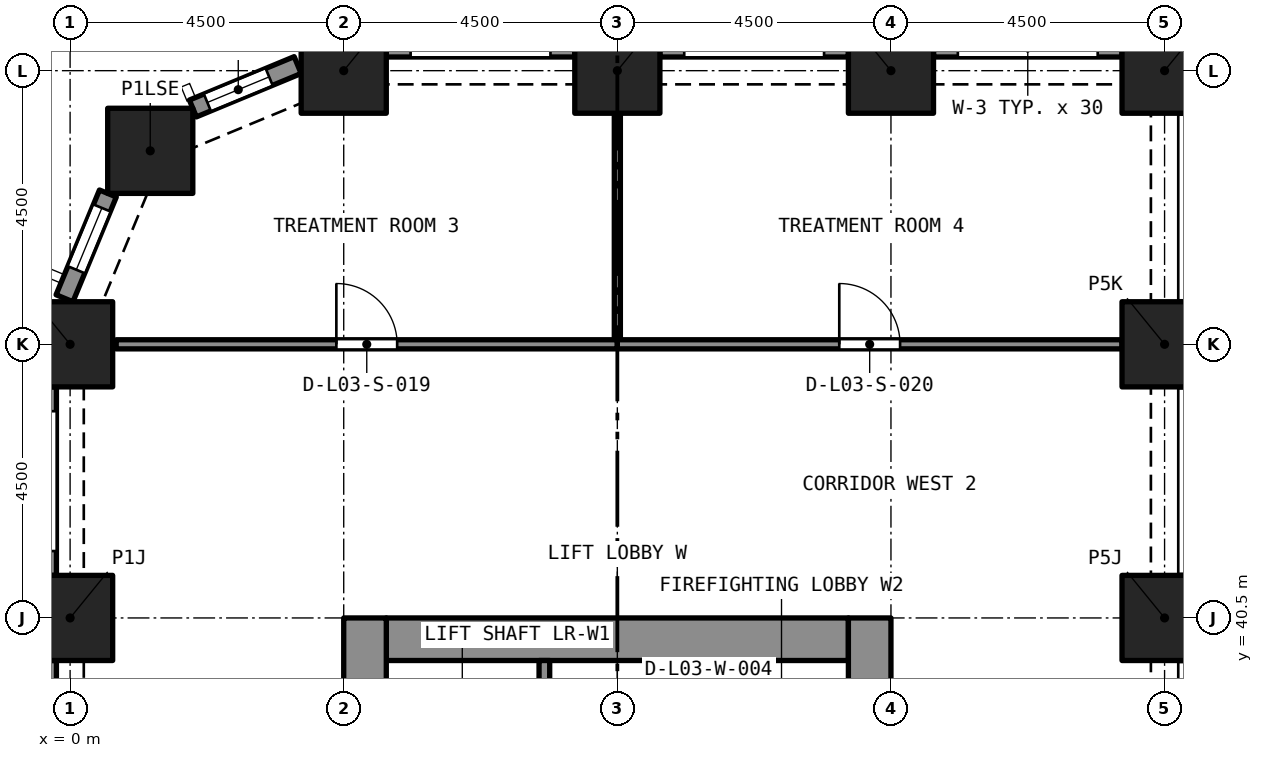
"""IFC4 building model, lengths in metres.
Left out: names, types, materials, properties, quantities, classifications, styles, units other than length and angle.
Written with IfcOpenShell. Run it as: python <this file> out.ifc"""

import sys

from ifc_helpers import new_model, si_unit, direction, frame, frame_2d, origin, origin_2d, place, context, subcontext, project, spatial, rectangle, extrude, element, fill, save


model = new_model("IFC4")
c1 = context("Model", 3, precision=1e-05, world=origin(), true_north=direction((0.0, 1.0)))
c2 = subcontext(c1, "Body", "Model", "MODEL_VIEW")
j1 = project(units=[si_unit("LENGTHUNIT", "METRE"), si_unit("PLANEANGLEUNIT", "RADIAN")], contexts=[c1])
p1 = place(None, origin())
s1 = spatial("IfcSite", under=j1, at=p1, CompositionType="ELEMENT")
p2 = place(p1, origin())
s2 = spatial("IfcBuilding", under=s1, at=p2, CompositionType="ELEMENT")
p3 = place(p2, frame((0.0, 0.0, 16.0)))
s3 = spatial("IfcBuildingStorey", under=s2, at=p3, CompositionType="ELEMENT", Elevation=16.0)
for number, where, z_axis, x_axis in (
    (1, (0.0, 40.5, 0.0), (0.0, 0.0, 1.0), (1.0, 0.0, 0.0)),
    (2, (18.0, 40.5, 0.0), (0.0, 0.0, 1.0), (1.0, 0.0, 0.0)),
    (3, (0.0, 45.0, 0.0), (0.0, 0.0, 1.0), (1.0, 0.0, 0.0)),
    (4, (18.0, 45.0, 0.0), (0.0, 0.0, 1.0), (1.0, 0.0, 0.0)),
    (5, (1.318, 48.182, 0.0), (0.0, 0.0, 1.0), (1.0, 0.0, 0.0)),
    (6, (4.5, 49.5, 0.0), (0.0, 0.0, 1.0), (1.0, 0.0, 0.0)),
    (7, (9.0, 49.5, 0.0), (0.0, 0.0, 1.0), (1.0, 0.0, 0.0)),
    (8, (13.5, 49.5, 0.0), (0.0, 0.0, 1.0), (1.0, 0.0, 0.0)),
    (9, (18.0, 49.5, 0.0), (0.0, 0.0, 1.0), (1.0, 0.0, 0.0)),
):
    element("IfcColumn", number, at=place(p3, frame(where, z_axis=z_axis, x_axis=x_axis)), inside=s3, PredefinedType="COLUMN", context=c2, shape_type="SweptSolid", body=[
        extrude(rectangle(XDim=1.4, YDim=1.4, at=origin_2d()), origin(), (0.0, 0.0, 1.0), 5.0),
    ])
p4 = place(p3, frame((5.2, 40.15, 0.0), z_axis=(0.0, 0.0, 1.0), x_axis=(1.0, 0.0, 0.0)))
e10 = element("IfcWall", 10, at=p4, inside=s3, PredefinedType="SOLIDWALL", context=c2, shape_type="SweptSolid", body=[
    extrude(rectangle(XDim=7.6, YDim=0.7, at=frame_2d((3.8, 0.0))), origin(), (0.0, 0.0, 1.0), 5.0),
])
p5 = place(p3, frame((4.85, 27.0, 0.0), z_axis=(0.0, 0.0, 1.0), x_axis=(0.0, 1.0, 0.0)))
e11 = element("IfcWall", 11, at=p5, inside=s3, PredefinedType="SOLIDWALL", context=c2, shape_type="SweptSolid", body=[
    extrude(rectangle(XDim=13.5, YDim=0.7, at=frame_2d((6.75, 0.0))), origin(), (0.0, 0.0, 1.0), 5.0),
])
p6 = place(p5, frame((8.95, 0.0, 0.0)))
e12 = element("IfcOpeningElement", 12, at=p6, cuts=e11, PredefinedType="OPENING", context=c2, shape_type="SweptSolid", body=[
    extrude(rectangle(XDim=1.2, YDim=2.1, at=frame_2d((0.6, 1.05))), frame((0.0, 0.36, 0.0), z_axis=(0.0, -1.0, 0.0), x_axis=(1.0, 0.0, 0.0)), (0.0, 0.0, 1.0), 0.72),
])
p7 = place(p3, frame((13.15, 27.0, 0.0), z_axis=(0.0, 0.0, 1.0), x_axis=(0.0, 1.0, 0.0)))
e13 = element("IfcWall", 13, at=p7, inside=s3, PredefinedType="SOLIDWALL", context=c2, shape_type="SweptSolid", body=[
    extrude(rectangle(XDim=13.5, YDim=0.7, at=frame_2d((6.75, 0.0))), origin(), (0.0, 0.0, 1.0), 5.0),
])
p8 = place(p7, frame((11.1, 0.0, 0.0)))
e14 = element("IfcOpeningElement", 14, at=p8, cuts=e13, PredefinedType="OPENING", context=c2, shape_type="SweptSolid", body=[
    extrude(rectangle(XDim=1.1, YDim=2.1, at=frame_2d((0.55, 1.05))), frame((0.0, 0.36, 0.0), z_axis=(0.0, -1.0, 0.0), x_axis=(1.0, 0.0, 0.0)), (0.0, 0.0, 1.0), 0.72),
])
p9 = place(p7, frame((8.95, 0.0, 0.0)))
e15 = element("IfcOpeningElement", 15, at=p9, cuts=e13, PredefinedType="OPENING", context=c2, shape_type="SweptSolid", body=[
    extrude(rectangle(XDim=1.2, YDim=2.1, at=frame_2d((0.6, 1.05))), frame((0.0, 0.36, 0.0), z_axis=(0.0, -1.0, 0.0), x_axis=(1.0, 0.0, 0.0)), (0.0, 0.0, 1.0), 0.72),
])
p10 = place(p3, frame((14.2, 49.875, 0.0), z_axis=(0.0, 0.0, 1.0), x_axis=(1.0, 0.0, 0.0)))
e16 = element("IfcWall", 16, at=p10, inside=s3, PredefinedType="SOLIDWALL", context=c2, shape_type="SweptSolid", body=[
    extrude(rectangle(XDim=3.1, YDim=0.3, at=frame_2d((1.55, 0.0))), origin(), (0.0, 0.0, 1.0), 5.0),
])
p11 = place(p10, frame((0.4, 0.0, 0.45)))
e17 = element("IfcOpeningElement", 17, at=p11, cuts=e16, PredefinedType="OPENING", context=c2, shape_type="SweptSolid", body=[
    extrude(rectangle(XDim=2.3, YDim=3.3, at=frame_2d((1.15, 1.65))), frame((0.0, 0.16, 0.0), z_axis=(0.0, -1.0, 0.0), x_axis=(1.0, 0.0, 0.0)), (0.0, 0.0, 1.0), 0.32),
])
p12 = place(p3, frame((9.7, 49.875, 0.0), z_axis=(0.0, 0.0, 1.0), x_axis=(1.0, 0.0, 0.0)))
e18 = element("IfcWall", 18, at=p12, inside=s3, PredefinedType="SOLIDWALL", context=c2, shape_type="SweptSolid", body=[
    extrude(rectangle(XDim=3.1, YDim=0.3, at=frame_2d((1.55, 0.0))), origin(), (0.0, 0.0, 1.0), 5.0),
])
p13 = place(p12, frame((0.4, 0.0, 0.45)))
e19 = element("IfcOpeningElement", 19, at=p13, cuts=e18, PredefinedType="OPENING", context=c2, shape_type="SweptSolid", body=[
    extrude(rectangle(XDim=2.3, YDim=3.3, at=frame_2d((1.15, 1.65))), frame((0.0, 0.16, 0.0), z_axis=(0.0, -1.0, 0.0), x_axis=(1.0, 0.0, 0.0)), (0.0, 0.0, 1.0), 0.32),
])
p14 = place(p3, frame((5.2, 49.875, 0.0), z_axis=(0.0, 0.0, 1.0), x_axis=(1.0, 0.0, 0.0)))
e20 = element("IfcWall", 20, at=p14, inside=s3, PredefinedType="SOLIDWALL", context=c2, shape_type="SweptSolid", body=[
    extrude(rectangle(XDim=3.1, YDim=0.3, at=frame_2d((1.55, 0.0))), origin(), (0.0, 0.0, 1.0), 5.0),
])
p15 = place(p14, frame((0.4, 0.0, 0.45)))
e21 = element("IfcOpeningElement", 21, at=p15, cuts=e20, PredefinedType="OPENING", context=c2, shape_type="SweptSolid", body=[
    extrude(rectangle(XDim=2.3, YDim=3.3, at=frame_2d((1.15, 1.65))), frame((0.0, 0.16, 0.0), z_axis=(0.0, -1.0, 0.0), x_axis=(1.0, 0.0, 0.0)), (0.0, 0.0, 1.0), 0.32),
])
p16 = place(p3, frame((2.02, 48.878, 0.0), z_axis=(0.0, 0.0, 1.0), x_axis=(0.923903565336, 0.38262540684, 0.0)))
e22 = element("IfcWall", 22, at=p16, inside=s3, PredefinedType="SOLIDWALL", context=c2, shape_type="SweptSolid", body=[
    extrude(rectangle(XDim=1.865, YDim=0.3, at=frame_2d((0.933, 0.0))), origin(), (0.0, 0.0, 1.0), 5.0),
])
p17 = place(p16, frame((0.258, 0.0, 0.45)))
e23 = element("IfcOpeningElement", 23, at=p17, cuts=e22, PredefinedType="OPENING", context=c2, shape_type="SweptSolid", body=[
    extrude(rectangle(XDim=1.1, YDim=3.3, at=frame_2d((0.55, 1.65))), frame((0.0, 0.16, 0.0), z_axis=(0.0, -1.0, 0.0), x_axis=(1.0, 0.0, 0.0)), (0.0, 0.0, 1.0), 0.32),
])
p18 = place(p3, frame((-0.092, 45.757, 0.0), z_axis=(0.0, 0.0, 1.0), x_axis=(0.382737135771, 0.923857286003, 0.0)))
e24 = element("IfcWall", 24, at=p18, inside=s3, PredefinedType="SOLIDWALL", context=c2, shape_type="SweptSolid", body=[
    extrude(rectangle(XDim=1.865, YDim=0.3, at=frame_2d((0.933, 0.0))), origin(), (0.0, 0.0, 1.0), 5.0),
])
p19 = place(p18, frame((0.508, 0.0, 0.45)))
e25 = element("IfcOpeningElement", 25, at=p19, cuts=e24, PredefinedType="OPENING", context=c2, shape_type="SweptSolid", body=[
    extrude(rectangle(XDim=1.1, YDim=3.3, at=frame_2d((0.55, 1.65))), frame((0.0, 0.16, 0.0), z_axis=(0.0, -1.0, 0.0), x_axis=(1.0, 0.0, 0.0)), (0.0, 0.0, 1.0), 0.32),
])
p20 = place(p3, frame((-0.375, 41.2, 0.0), z_axis=(0.0, 0.0, 1.0), x_axis=(0.0, 1.0, 0.0)))
e26 = element("IfcWall", 26, at=p20, inside=s3, PredefinedType="SOLIDWALL", context=c2, shape_type="SweptSolid", body=[
    extrude(rectangle(XDim=3.1, YDim=0.3, at=frame_2d((1.55, 0.0))), origin(), (0.0, 0.0, 1.0), 5.0),
])
p21 = place(p20, frame((0.4, 0.0, 0.45)))
e27 = element("IfcOpeningElement", 27, at=p21, cuts=e26, PredefinedType="OPENING", context=c2, shape_type="SweptSolid", body=[
    extrude(rectangle(XDim=2.3, YDim=3.3, at=frame_2d((1.15, 1.65))), frame((0.0, 0.16, 0.0), z_axis=(0.0, -1.0, 0.0), x_axis=(1.0, 0.0, 0.0)), (0.0, 0.0, 1.0), 0.32),
])
p22 = place(p3, frame((-0.375, 36.7, 0.0), z_axis=(0.0, 0.0, 1.0), x_axis=(0.0, 1.0, 0.0)))
e28 = element("IfcWall", 28, at=p22, inside=s3, PredefinedType="SOLIDWALL", context=c2, shape_type="SweptSolid", body=[
    extrude(rectangle(XDim=3.1, YDim=0.3, at=frame_2d((1.55, 0.0))), origin(), (0.0, 0.0, 1.0), 5.0),
])
p23 = place(p22, frame((0.4, 0.0, 0.45)))
e29 = element("IfcOpeningElement", 29, at=p23, cuts=e28, PredefinedType="OPENING", context=c2, shape_type="SweptSolid", body=[
    extrude(rectangle(XDim=2.3, YDim=3.3, at=frame_2d((1.15, 1.65))), frame((0.0, 0.16, 0.0), z_axis=(0.0, -1.0, 0.0), x_axis=(1.0, 0.0, 0.0)), (0.0, 0.0, 1.0), 0.32),
])
p24 = place(p3, frame((7.8, 37.5, 0.0), z_axis=(0.0, 0.0, 1.0), x_axis=(0.0, 1.0, 0.0)))
e30 = element("IfcWall", 30, at=p24, inside=s3, PredefinedType="SOLIDWALL", context=c2, shape_type="SweptSolid", body=[
    extrude(rectangle(XDim=2.3, YDim=0.175, at=frame_2d((1.15, 0.0))), origin(), (0.0, 0.0, 1.0), 4.65),
])
p25 = place(p3, frame((10.5, 37.5, 0.0), z_axis=(0.0, 0.0, 1.0), x_axis=(0.0, 1.0, 0.0)))
e31 = element("IfcWall", 31, at=p25, inside=s3, PredefinedType="SOLIDWALL", context=c2, shape_type="SweptSolid", body=[
    extrude(rectangle(XDim=2.3, YDim=0.175, at=frame_2d((1.15, 0.0))), origin(), (0.0, 0.0, 1.0), 4.65),
])
p26 = place(p25, frame((0.65, 0.0, 0.0)))
e32 = element("IfcOpeningElement", 32, at=p26, cuts=e31, PredefinedType="OPENING", context=c2, shape_type="SweptSolid", body=[
    extrude(rectangle(XDim=1.0, YDim=2.1, at=frame_2d((0.5, 1.05))), frame((0.0, 0.097, 0.0), z_axis=(0.0, -1.0, 0.0), x_axis=(1.0, 0.0, 0.0)), (0.0, 0.0, 1.0), 0.195),
])
p27 = place(p3, frame((9.0, 45.075, 0.0), z_axis=(0.0, 0.0, 1.0), x_axis=(0.0, 1.0, 0.0)))
e33 = element("IfcWall", 33, at=p27, inside=s3, PredefinedType="PARTITIONING", context=c2, shape_type="SweptSolid", body=[
    extrude(rectangle(XDim=3.725, YDim=0.1, at=frame_2d((1.863, 0.0))), origin(), (0.0, 0.0, 1.0), 4.65),
])
p28 = place(p3, frame((0.758, 45.0, 0.0), z_axis=(0.0, 0.0, 1.0), x_axis=(1.0, 0.0, 0.0)))
e34 = element("IfcWall", 34, at=p28, inside=s3, PredefinedType="PARTITIONING", context=c2, shape_type="SweptSolid", body=[
    extrude(rectangle(XDim=8.242, YDim=0.15, at=frame_2d((4.121, 0.0))), origin(), (0.0, 0.0, 1.0), 4.65),
])
p29 = place(p28, frame((3.621, 0.0, 0.0)))
e35 = element("IfcOpeningElement", 35, at=p29, cuts=e34, PredefinedType="OPENING", context=c2, shape_type="SweptSolid", body=[
    extrude(rectangle(XDim=1.0, YDim=2.1, at=frame_2d((0.5, 1.05))), frame((0.0, 0.085, 0.0), z_axis=(0.0, -1.0, 0.0), x_axis=(1.0, 0.0, 0.0)), (0.0, 0.0, 1.0), 0.17),
])
p30 = place(p3, frame((9.0, 45.0, 0.0), z_axis=(0.0, 0.0, 1.0), x_axis=(1.0, 0.0, 0.0)))
e36 = element("IfcWall", 36, at=p30, inside=s3, PredefinedType="PARTITIONING", context=c2, shape_type="SweptSolid", body=[
    extrude(rectangle(XDim=8.3, YDim=0.15, at=frame_2d((4.15, 0.0))), origin(), (0.0, 0.0, 1.0), 4.65),
])
p31 = place(p30, frame((3.65, 0.0, 0.0)))
e37 = element("IfcOpeningElement", 37, at=p31, cuts=e36, PredefinedType="OPENING", context=c2, shape_type="SweptSolid", body=[
    extrude(rectangle(XDim=1.0, YDim=2.1, at=frame_2d((0.5, 1.05))), frame((0.0, 0.085, 0.0), z_axis=(0.0, -1.0, 0.0), x_axis=(1.0, 0.0, 0.0)), (0.0, 0.0, 1.0), 0.17),
])
p32 = place(p17, origin())
e38 = element("IfcWindow", 38, at=p32, inside=s3, PartitioningType="SINGLE_PANEL", PredefinedType="WINDOW", context=c2, shape_type="SweptSolid", body=[
    extrude(rectangle(XDim=1.1, YDim=3.3, at=frame_2d((0.55, 1.65))), frame((0.0, 0.03, 0.0), z_axis=(0.0, -1.0, 0.0), x_axis=(1.0, 0.0, 0.0)), (0.0, 0.0, 1.0), 0.06),
])
fill(e23, e38)
p33 = place(p19, origin())
e39 = element("IfcWindow", 39, at=p33, inside=s3, PartitioningType="SINGLE_PANEL", PredefinedType="WINDOW", context=c2, shape_type="SweptSolid", body=[
    extrude(rectangle(XDim=1.1, YDim=3.3, at=frame_2d((0.55, 1.65))), frame((0.0, 0.03, 0.0), z_axis=(0.0, -1.0, 0.0), x_axis=(1.0, 0.0, 0.0)), (0.0, 0.0, 1.0), 0.06),
])
fill(e25, e39)
p34 = place(p29, origin())
e40 = element("IfcDoor", 40, at=p34, inside=s3, OperationType="SINGLE_SWING_RIGHT", PredefinedType="DOOR", context=c2, shape_type="SweptSolid", body=[
    extrude(rectangle(XDim=1.0, YDim=2.1, at=frame_2d((0.5, 1.05))), frame((0.0, 0.025, 0.0), z_axis=(0.0, -1.0, 0.0), x_axis=(1.0, 0.0, 0.0)), (0.0, 0.0, 1.0), 0.05),
])
fill(e35, e40)
p35 = place(p31, origin())
e41 = element("IfcDoor", 41, at=p35, inside=s3, OperationType="SINGLE_SWING_RIGHT", PredefinedType="DOOR", context=c2, shape_type="SweptSolid", body=[
    extrude(rectangle(XDim=1.0, YDim=2.1, at=frame_2d((0.5, 1.05))), frame((0.0, 0.025, 0.0), z_axis=(0.0, -1.0, 0.0), x_axis=(1.0, 0.0, 0.0)), (0.0, 0.0, 1.0), 0.05),
])
fill(e37, e41)
save(model, sys.argv[1])
